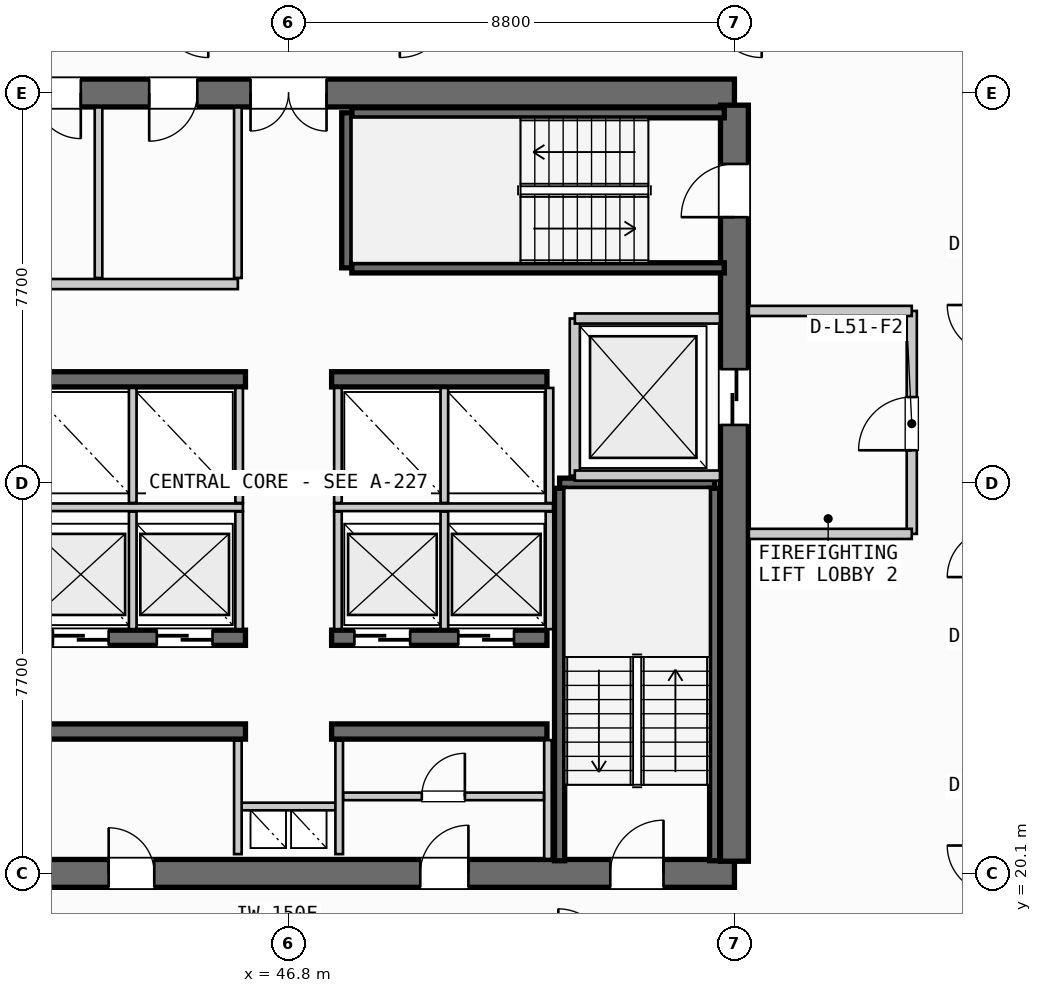
"""IFC4 building model, lengths in metres.
Left out: names, types, materials, properties, quantities, classifications, styles, units other than length and angle.
Written with IfcOpenShell. Run it as: python <this file> out.ifc"""

import sys

from ifc_helpers import new_model, si_unit, direction, frame, frame_2d, origin, place, context, subcontext, project, spatial, rectangle, extrude, source, transform, mapped, element, fill, save


model = new_model("IFC4")
c1 = context("Model", 3, precision=1e-05, world=origin(), true_north=direction((0.0, 1.0)))
c2 = subcontext(c1, "Body", "Model", "MODEL_VIEW")
j1 = project(units=[si_unit("LENGTHUNIT", "METRE"), si_unit("PLANEANGLEUNIT", "RADIAN")], contexts=[c1])
p1 = place(None, origin())
s1 = spatial("IfcSite", under=j1, at=p1, CompositionType="ELEMENT")
p2 = place(p1, origin())
s2 = spatial("IfcBuilding", under=s1, at=p2, CompositionType="ELEMENT")
p3 = place(p2, frame((0.0, 0.0, 197.4)))
s3 = spatial("IfcBuildingStorey", under=s2, at=p3, CompositionType="ELEMENT", Elevation=197.4)
p4 = place(p3, frame((38.0, 20.1, 0.0), z_axis=(0.0, 0.0, 1.0), x_axis=(1.0, 0.0, 0.0)))
e1 = element("IfcWall", 1, at=p4, inside=s3, PredefinedType="SHEAR", context=c2, shape_type="SweptSolid", body=[
    extrude(rectangle(XDim=17.6, YDim=0.55, at=frame_2d((8.8, 0.0))), origin(), (0.0, 0.0, 1.0), 3.26),
])
p5 = place(p4, frame((1.4, 0.0, 0.0)))
e2 = element("IfcOpeningElement", 2, at=p5, cuts=e1, PredefinedType="OPENING", context=c2, shape_type="SweptSolid", body=[
    extrude(rectangle(XDim=1.05, YDim=2.15, at=frame_2d((0.525, 1.075))), frame((0.0, 0.285, 0.0), z_axis=(0.0, -1.0, 0.0), x_axis=(1.0, 0.0, 0.0)), (0.0, 0.0, 1.0), 0.57),
])
p6 = place(p4, frame((15.15, 0.0, 0.0)))
e3 = element("IfcOpeningElement", 3, at=p6, cuts=e1, PredefinedType="OPENING", context=c2, shape_type="SweptSolid", body=[
    extrude(rectangle(XDim=1.05, YDim=2.15, at=frame_2d((0.525, 1.075))), frame((0.0, 0.285, 0.0), z_axis=(0.0, -1.0, 0.0), x_axis=(1.0, 0.0, 0.0)), (0.0, 0.0, 1.0), 0.57),
])
p7 = place(p4, frame((5.25, 0.0, 0.0)))
e4 = element("IfcOpeningElement", 4, at=p7, cuts=e1, PredefinedType="OPENING", context=c2, shape_type="SweptSolid", body=[
    extrude(rectangle(XDim=0.9, YDim=2.15, at=frame_2d((0.45, 1.075))), frame((0.0, 0.285, 0.0), z_axis=(0.0, -1.0, 0.0), x_axis=(1.0, 0.0, 0.0)), (0.0, 0.0, 1.0), 0.57),
])
p8 = place(p4, frame((11.4, 0.0, 0.0)))
e5 = element("IfcOpeningElement", 5, at=p8, cuts=e1, PredefinedType="OPENING", context=c2, shape_type="SweptSolid", body=[
    extrude(rectangle(XDim=0.95, YDim=2.15, at=frame_2d((0.475, 1.075))), frame((0.0, 0.285, 0.0), z_axis=(0.0, -1.0, 0.0), x_axis=(1.0, 0.0, 0.0)), (0.0, 0.0, 1.0), 0.57),
])
p9 = place(p3, frame((55.6, 35.5, 0.0), z_axis=(0.0, 0.0, 1.0), x_axis=(-1.0, 0.0, 0.0)))
e6 = element("IfcWall", 6, at=p9, inside=s3, PredefinedType="SHEAR", context=c2, shape_type="SweptSolid", body=[
    extrude(rectangle(XDim=17.6, YDim=0.55, at=frame_2d((8.8, 0.0))), origin(), (0.0, 0.0, 1.0), 3.26),
])
p10 = place(p9, frame((8.05, 0.0, 0.0)))
e7 = element("IfcOpeningElement", 7, at=p10, cuts=e6, PredefinedType="OPENING", context=c2, shape_type="SweptSolid", body=[
    extrude(rectangle(XDim=1.5, YDim=2.2, at=frame_2d((0.75, 1.1))), frame((0.0, 0.285, 0.0), z_axis=(0.0, -1.0, 0.0), x_axis=(1.0, 0.0, 0.0)), (0.0, 0.0, 1.0), 0.57),
])
p11 = place(p9, frame((15.1, 0.0, 0.0)))
e8 = element("IfcOpeningElement", 8, at=p11, cuts=e6, PredefinedType="OPENING", context=c2, shape_type="SweptSolid", body=[
    extrude(rectangle(XDim=0.95, YDim=2.15, at=frame_2d((0.475, 1.075))), frame((0.0, 0.285, 0.0), z_axis=(0.0, -1.0, 0.0), x_axis=(1.0, 0.0, 0.0)), (0.0, 0.0, 1.0), 0.57),
])
p12 = place(p9, frame((12.9, 0.0, 0.0)))
e9 = element("IfcOpeningElement", 9, at=p12, cuts=e6, PredefinedType="OPENING", context=c2, shape_type="SweptSolid", body=[
    extrude(rectangle(XDim=0.9, YDim=2.15, at=frame_2d((0.45, 1.075))), frame((0.0, 0.285, 0.0), z_axis=(0.0, -1.0, 0.0), x_axis=(1.0, 0.0, 0.0)), (0.0, 0.0, 1.0), 0.57),
])
p13 = place(p9, frame((10.6, 0.0, 0.0)))
e10 = element("IfcOpeningElement", 10, at=p13, cuts=e6, PredefinedType="OPENING", context=c2, shape_type="SweptSolid", body=[
    extrude(rectangle(XDim=0.95, YDim=2.15, at=frame_2d((0.475, 1.075))), frame((0.0, 0.285, 0.0), z_axis=(0.0, -1.0, 0.0), x_axis=(1.0, 0.0, 0.0)), (0.0, 0.0, 1.0), 0.57),
])
p14 = place(p3, frame((55.6, 20.34, 0.0), z_axis=(0.0, 0.0, 1.0), x_axis=(0.0, 1.0, 0.0)))
e11 = element("IfcWall", 11, at=p14, inside=s3, PredefinedType="SHEAR", context=c2, shape_type="SweptSolid", body=[
    extrude(rectangle(XDim=14.92, YDim=0.55, at=frame_2d((7.46, 0.0))), origin(), (0.0, 0.0, 1.0), 3.26),
])
p15 = place(p14, frame((12.71, 0.0, 0.0)))
e12 = element("IfcOpeningElement", 12, at=p15, cuts=e11, PredefinedType="OPENING", context=c2, shape_type="SweptSolid", body=[
    extrude(rectangle(XDim=1.05, YDim=2.15, at=frame_2d((0.525, 1.075))), frame((0.0, 0.285, 0.0), z_axis=(0.0, -1.0, 0.0), x_axis=(1.0, 0.0, 0.0)), (0.0, 0.0, 1.0), 0.57),
])
p16 = place(p14, frame((8.61, 0.0, 0.0)))
e13 = element("IfcOpeningElement", 13, at=p16, cuts=e11, PredefinedType="OPENING", context=c2, shape_type="SweptSolid", body=[
    extrude(rectangle(XDim=1.1, YDim=2.2, at=frame_2d((0.55, 1.1))), frame((0.0, 0.285, 0.0), z_axis=(0.0, -1.0, 0.0), x_axis=(1.0, 0.0, 0.0)), (0.0, 0.0, 1.0), 0.57),
])
for number, where, z_axis, x_axis in (
    (14, (41.7, 22.9, 0.0), (0.0, 0.0, 1.0), (1.0, 0.0, 0.0)),
    (15, (47.65, 22.9, 0.0), (0.0, 0.0, 1.0), (1.0, 0.0, 0.0)),
):
    element("IfcWall", number, at=place(p3, frame(where, z_axis=z_axis, x_axis=x_axis)), inside=s3, PredefinedType="SHEAR", context=c2, shape_type="SweptSolid", body=[
        extrude(rectangle(XDim=4.25, YDim=0.3, at=frame_2d((2.125, 0.0))), origin(), (0.0, 0.0, 1.0), 3.26),
    ])
p17 = place(p3, frame((41.7, 24.75, 0.0), z_axis=(0.0, 0.0, 1.0), x_axis=(1.0, 0.0, 0.0)))
e16 = element("IfcWall", 16, at=p17, inside=s3, PredefinedType="SHEAR", context=c2, shape_type="SweptSolid", body=[
    extrude(rectangle(XDim=4.25, YDim=0.3, at=frame_2d((2.125, 0.0))), origin(), (0.0, 0.0, 1.0), 3.26),
])
p18 = place(p17, frame((0.45, 0.0, 0.0)))
e17 = element("IfcOpeningElement", 17, at=p18, cuts=e16, PredefinedType="OPENING", context=c2, shape_type="SweptSolid", body=[
    extrude(rectangle(XDim=1.1, YDim=2.2, at=frame_2d((0.55, 1.1))), frame((0.0, 0.16, 0.0), z_axis=(0.0, -1.0, 0.0), x_axis=(1.0, 0.0, 0.0)), (0.0, 0.0, 1.0), 0.32),
])
p19 = place(p17, frame((2.5, 0.0, 0.0)))
e18 = element("IfcOpeningElement", 18, at=p19, cuts=e16, PredefinedType="OPENING", context=c2, shape_type="SweptSolid", body=[
    extrude(rectangle(XDim=1.1, YDim=2.2, at=frame_2d((0.55, 1.1))), frame((0.0, 0.16, 0.0), z_axis=(0.0, -1.0, 0.0), x_axis=(1.0, 0.0, 0.0)), (0.0, 0.0, 1.0), 0.32),
])
p20 = place(p3, frame((47.65, 24.75, 0.0), z_axis=(0.0, 0.0, 1.0), x_axis=(1.0, 0.0, 0.0)))
e19 = element("IfcWall", 19, at=p20, inside=s3, PredefinedType="SHEAR", context=c2, shape_type="SweptSolid", body=[
    extrude(rectangle(XDim=4.25, YDim=0.3, at=frame_2d((2.125, 0.0))), origin(), (0.0, 0.0, 1.0), 3.26),
])
p21 = place(p20, frame((0.45, 0.0, 0.0)))
e20 = element("IfcOpeningElement", 20, at=p21, cuts=e19, PredefinedType="OPENING", context=c2, shape_type="SweptSolid", body=[
    extrude(rectangle(XDim=1.1, YDim=2.2, at=frame_2d((0.55, 1.1))), frame((0.0, 0.16, 0.0), z_axis=(0.0, -1.0, 0.0), x_axis=(1.0, 0.0, 0.0)), (0.0, 0.0, 1.0), 0.32),
])
p22 = place(p20, frame((2.5, 0.0, 0.0)))
e21 = element("IfcOpeningElement", 21, at=p22, cuts=e19, PredefinedType="OPENING", context=c2, shape_type="SweptSolid", body=[
    extrude(rectangle(XDim=1.1, YDim=2.2, at=frame_2d((0.55, 1.1))), frame((0.0, 0.16, 0.0), z_axis=(0.0, -1.0, 0.0), x_axis=(1.0, 0.0, 0.0)), (0.0, 0.0, 1.0), 0.32),
])
for number, where, z_axis, x_axis in (
    (22, (41.7, 29.85, 0.0), (0.0, 0.0, 1.0), (1.0, 0.0, 0.0)),
    (23, (47.65, 29.85, 0.0), (0.0, 0.0, 1.0), (1.0, 0.0, 0.0)),
):
    element("IfcWall", number, at=place(p3, frame(where, z_axis=z_axis, x_axis=x_axis)), inside=s3, PredefinedType="SHEAR", context=c2, shape_type="SweptSolid", body=[
        extrude(rectangle(XDim=4.25, YDim=0.3, at=frame_2d((2.125, 0.0))), origin(), (0.0, 0.0, 1.0), 3.26),
    ])
p23 = place(p3, frame((52.15, 27.8, 0.0), z_axis=(0.0, 0.0, 1.0), x_axis=(1.0, 0.0, 0.0)))
e24 = element("IfcWall", 24, at=p23, inside=s3, PredefinedType="SHEAR", context=c2, shape_type="SweptSolid", body=[
    extrude(rectangle(XDim=3.06, YDim=0.2, at=frame_2d((1.53, 0.0))), origin(), (0.0, 0.0, 1.0), 3.26),
])
for number, where, z_axis, x_axis in (
    (25, (55.21, 27.7, 0.0), (0.0, 0.0, 1.0), (0.0, -1.0, 0.0)),
    (26, (52.15, 20.35, 0.0), (0.0, 0.0, 1.0), (0.0, 1.0, 0.0)),
):
    element("IfcWall", number, at=place(p3, frame(where, z_axis=z_axis, x_axis=x_axis)), inside=s3, PredefinedType="SHEAR", context=c2, shape_type="SweptSolid", body=[
        extrude(rectangle(XDim=7.35, YDim=0.2, at=frame_2d((3.675, 0.0))), origin(), (0.0, 0.0, 1.0), 3.26),
    ])
p24 = place(p3, frame((47.95, 32.05, 0.0), z_axis=(0.0, 0.0, 1.0), x_axis=(0.0, 1.0, 0.0)))
e27 = element("IfcWall", 27, at=p24, inside=s3, PredefinedType="SHEAR", context=c2, shape_type="SweptSolid", body=[
    extrude(rectangle(XDim=3.06, YDim=0.2, at=frame_2d((1.53, 0.0))), origin(), (0.0, 0.0, 1.0), 3.26),
])
for number, where, z_axis, x_axis in (
    (28, (48.05, 35.11, 0.0), (0.0, 0.0, 1.0), (1.0, 0.0, 0.0)),
    (29, (55.4, 32.05, 0.0), (0.0, 0.0, 1.0), (-1.0, 0.0, 0.0)),
):
    element("IfcWall", number, at=place(p3, frame(where, z_axis=z_axis, x_axis=x_axis)), inside=s3, PredefinedType="SHEAR", context=c2, shape_type="SweptSolid", body=[
        extrude(rectangle(XDim=7.35, YDim=0.2, at=frame_2d((3.675, 0.0))), origin(), (0.0, 0.0, 1.0), 3.26),
    ])
p25 = place(p3, frame((45.8, 21.42, 0.0), z_axis=(0.0, 0.0, 1.0), x_axis=(1.0, 0.0, 0.0)))
e30 = element("IfcWall", 30, at=p25, inside=s3, PredefinedType="PARTITIONING", context=c2, shape_type="SweptSolid", body=[
    extrude(rectangle(XDim=2.0, YDim=0.15, at=frame_2d((1.0, 0.0))), origin(), (0.0, 0.0, 1.0), 2.595),
])
for number, where, z_axis, x_axis in (
    (31, (45.8, 20.48, 0.0), (0.0, 0.0, 1.0), (0.0, 1.0, 0.0)),
    (32, (47.8, 20.48, 0.0), (0.0, 0.0, 1.0), (0.0, 1.0, 0.0)),
):
    element("IfcWall", number, at=place(p3, frame(where, z_axis=z_axis, x_axis=x_axis)), inside=s3, PredefinedType="PARTITIONING", context=c2, shape_type="SweptSolid", body=[
        extrude(rectangle(XDim=2.24, YDim=0.15, at=frame_2d((1.12, 0.0))), origin(), (0.0, 0.0, 1.0), 2.595),
    ])
p26 = place(p3, frame((52.45, 27.95, 0.0), z_axis=(0.0, 0.0, 1.0), x_axis=(0.0, 1.0, 0.0)))
e33 = element("IfcWall", 33, at=p26, inside=s3, PredefinedType="PARTITIONING", context=c2, shape_type="SweptSolid", body=[
    extrude(rectangle(XDim=3.1, YDim=0.2, at=frame_2d((1.55, 0.0))), origin(), (0.0, 0.0, 1.0), 2.595),
])
for number, where, z_axis, x_axis in (
    (34, (52.45, 27.95, 0.0), (0.0, 0.0, 1.0), (1.0, 0.0, 0.0)),
    (35, (52.45, 31.05, 0.0), (0.0, 0.0, 1.0), (1.0, 0.0, 0.0)),
):
    element("IfcWall", number, at=place(p3, frame(where, z_axis=z_axis, x_axis=x_axis)), inside=s3, PredefinedType="PARTITIONING", context=c2, shape_type="SweptSolid", body=[
        extrude(rectangle(XDim=2.865, YDim=0.2, at=frame_2d((1.433, 0.0))), origin(), (0.0, 0.0, 1.0), 2.595),
    ])
p27 = place(p3, frame((59.1, 26.8, 0.0), z_axis=(0.0, 0.0, 1.0), x_axis=(0.0, 1.0, 0.0)))
e36 = element("IfcWall", 36, at=p27, inside=s3, PredefinedType="PARTITIONING", context=c2, shape_type="SweptSolid", body=[
    extrude(rectangle(XDim=4.4, YDim=0.2, at=frame_2d((2.2, 0.0))), origin(), (0.0, 0.0, 1.0), 2.595),
])
p28 = place(p27, frame((1.65, 0.0, 0.0)))
e37 = element("IfcOpeningElement", 37, at=p28, cuts=e36, PredefinedType="OPENING", context=c2, shape_type="SweptSolid", body=[
    extrude(rectangle(XDim=1.05, YDim=2.15, at=frame_2d((0.525, 1.075))), frame((0.0, 0.11, 0.0), z_axis=(0.0, -1.0, 0.0), x_axis=(1.0, 0.0, 0.0)), (0.0, 0.0, 1.0), 0.22),
])
for number, where, z_axis, x_axis in (
    (38, (55.885, 26.8, 0.0), (0.0, 0.0, 1.0), (1.0, 0.0, 0.0)),
    (39, (55.885, 31.2, 0.0), (0.0, 0.0, 1.0), (1.0, 0.0, 0.0)),
):
    element("IfcWall", number, at=place(p3, frame(where, z_axis=z_axis, x_axis=x_axis)), inside=s3, PredefinedType="PARTITIONING", context=c2, shape_type="SweptSolid", body=[
        extrude(rectangle(XDim=3.215, YDim=0.2, at=frame_2d((1.607, 0.0))), origin(), (0.0, 0.0, 1.0), 2.595),
    ])
p29 = place(p3, frame((51.92, 20.385, 0.0), z_axis=(0.0, 0.0, 1.0), x_axis=(0.0, 1.0, 0.0)))
e40 = element("IfcWall", 40, at=p29, inside=s3, PredefinedType="PARTITIONING", context=c2, shape_type="SweptSolid", body=[
    extrude(rectangle(XDim=2.345, YDim=0.15, at=frame_2d((1.172, 0.0))), origin(), (0.0, 0.0, 1.0), 2.595),
])
p30 = place(p3, frame((47.88, 21.62, 0.0), z_axis=(0.0, 0.0, 1.0), x_axis=(1.0, 0.0, 0.0)))
e41 = element("IfcWall", 41, at=p30, inside=s3, PredefinedType="PARTITIONING", context=c2, shape_type="SweptSolid", body=[
    extrude(rectangle(XDim=3.96, YDim=0.15, at=frame_2d((1.98, 0.0))), origin(), (0.0, 0.0, 1.0), 2.595),
])
p31 = place(p30, frame((1.55, 0.0, 0.0)))
e42 = element("IfcOpeningElement", 42, at=p31, cuts=e41, PredefinedType="OPENING", context=c2, shape_type="SweptSolid", body=[
    extrude(rectangle(XDim=0.85, YDim=2.15, at=frame_2d((0.425, 1.075))), frame((0.0, 0.085, 0.0), z_axis=(0.0, -1.0, 0.0), x_axis=(1.0, 0.0, 0.0)), (0.0, 0.0, 1.0), 0.17),
])
p32 = place(p3, frame((41.58, 27.325, 0.0), z_axis=(0.0, 0.0, 1.0), x_axis=(1.0, 0.0, 0.0)))
e43 = element("IfcWall", 43, at=p32, inside=s3, PredefinedType="PARTITIONING", context=c2, shape_type="SweptSolid", body=[
    extrude(rectangle(XDim=4.32, YDim=0.15, at=frame_2d((2.16, 0.0))), origin(), (0.0, 0.0, 1.0), 2.595),
])
p33 = place(p3, frame((47.7, 27.325, 0.0), z_axis=(0.0, 0.0, 1.0), x_axis=(1.0, 0.0, 0.0)))
e44 = element("IfcWall", 44, at=p33, inside=s3, PredefinedType="PARTITIONING", context=c2, shape_type="SweptSolid", body=[
    extrude(rectangle(XDim=4.32, YDim=0.15, at=frame_2d((2.16, 0.0))), origin(), (0.0, 0.0, 1.0), 2.595),
])
for number, where, z_axis, x_axis in (
    (45, (43.725, 24.92, 0.0), (0.0, 0.0, 1.0), (0.0, 1.0, 0.0)),
    (46, (45.825, 24.92, 0.0), (0.0, 0.0, 1.0), (0.0, 1.0, 0.0)),
    (47, (47.775, 24.92, 0.0), (0.0, 0.0, 1.0), (0.0, 1.0, 0.0)),
    (48, (49.875, 24.92, 0.0), (0.0, 0.0, 1.0), (0.0, 1.0, 0.0)),
    (49, (51.95, 24.92, 0.0), (0.0, 0.0, 1.0), (0.0, 1.0, 0.0)),
):
    element("IfcWall", number, at=place(p3, frame(where, z_axis=z_axis, x_axis=x_axis)), inside=s3, PredefinedType="PARTITIONING", context=c2, shape_type="SweptSolid", body=[
        extrude(rectangle(XDim=2.32, YDim=0.15, at=frame_2d((1.16, 0.0))), origin(), (0.0, 0.0, 1.0), 2.595),
    ])
for number, where, z_axis, x_axis in (
    (50, (43.725, 27.41, 0.0), (0.0, 0.0, 1.0), (0.0, 1.0, 0.0)),
    (51, (45.825, 27.41, 0.0), (0.0, 0.0, 1.0), (0.0, 1.0, 0.0)),
    (52, (47.775, 27.41, 0.0), (0.0, 0.0, 1.0), (0.0, 1.0, 0.0)),
    (53, (49.875, 27.41, 0.0), (0.0, 0.0, 1.0), (0.0, 1.0, 0.0)),
    (54, (51.95, 27.41, 0.0), (0.0, 0.0, 1.0), (0.0, 1.0, 0.0)),
):
    element("IfcWall", number, at=place(p3, frame(where, z_axis=z_axis, x_axis=x_axis)), inside=s3, PredefinedType="PARTITIONING", context=c2, shape_type="SweptSolid", body=[
        extrude(rectangle(XDim=2.27, YDim=0.15, at=frame_2d((1.135, 0.0))), origin(), (0.0, 0.0, 1.0), 2.595),
    ])
p34 = place(p3, frame((38.285, 31.73, 0.0), z_axis=(0.0, 0.0, 1.0), x_axis=(1.0, 0.0, 0.0)))
e55 = element("IfcWall", 55, at=p34, inside=s3, PredefinedType="PARTITIONING", context=c2, shape_type="SweptSolid", body=[
    extrude(rectangle(XDim=7.515, YDim=0.2, at=frame_2d((3.758, 0.0))), origin(), (0.0, 0.0, 1.0), 2.595),
])
p35 = place(p3, frame((45.8, 31.85, 0.0), z_axis=(0.0, 0.0, 1.0), x_axis=(0.0, 1.0, 0.0)))
e56 = element("IfcWall", 56, at=p35, inside=s3, PredefinedType="PARTITIONING", context=c2, shape_type="SweptSolid", body=[
    extrude(rectangle(XDim=3.365, YDim=0.15, at=frame_2d((1.683, 0.0))), origin(), (0.0, 0.0, 1.0), 2.595),
])
p36 = place(p3, frame((43.05, 31.85, 0.0), z_axis=(0.0, 0.0, 1.0), x_axis=(0.0, 1.0, 0.0)))
e57 = element("IfcWall", 57, at=p36, inside=s3, PredefinedType="PLUMBINGWALL", context=c2, shape_type="SweptSolid", body=[
    extrude(rectangle(XDim=3.365, YDim=0.15, at=frame_2d((1.683, 0.0))), origin(), (0.0, 0.0, 1.0), 2.595),
])
m1 = source(origin(), c2, "Body", "SweptSolid", [
    extrude(rectangle(XDim=1.05, YDim=2.15, at=frame_2d((0.525, 1.075))), frame((0.0, 0.025, 0.0), z_axis=(0.0, -1.0, 0.0), x_axis=(1.0, 0.0, 0.0)), (0.0, 0.0, 1.0), 0.05),
])
p37 = place(p6, origin())
e58 = element("IfcDoor", 58, at=p37, inside=s3, OperationType="SINGLE_SWING_RIGHT", PredefinedType="DOOR", context=c2, shape_type="MappedRepresentation", body=[
    mapped(m1, transform((0.0, 0.0, 0.0), scale=1.0)),
])
fill(e3, e58)
p38 = place(p15, origin())
e59 = element("IfcDoor", 59, at=p38, inside=s3, OperationType="SINGLE_SWING_LEFT", PredefinedType="DOOR", context=c2, shape_type="MappedRepresentation", body=[
    mapped(m1, transform((0.0, 0.0, 0.0), scale=1.0)),
])
fill(e12, e59)
m2 = source(origin(), c2, "Body", "SweptSolid", [
    extrude(rectangle(XDim=1.5, YDim=2.2, at=frame_2d((0.75, 1.1))), frame((0.0, 0.025, 0.0), z_axis=(0.0, -1.0, 0.0), x_axis=(1.0, 0.0, 0.0)), (0.0, 0.0, 1.0), 0.05),
])
p39 = place(p10, origin())
e60 = element("IfcDoor", 60, at=p39, inside=s3, OperationType="DOUBLE_DOOR_SINGLE_SWING", PredefinedType="DOOR", context=c2, shape_type="MappedRepresentation", body=[
    mapped(m2, transform((0.0, 0.0, 0.0), scale=1.0)),
])
fill(e7, e60)
m3 = source(origin(), c2, "Body", "SweptSolid", [
    extrude(rectangle(XDim=1.1, YDim=2.2, at=frame_2d((0.55, 1.1))), frame((0.0, 0.025, 0.0), z_axis=(0.0, -1.0, 0.0), x_axis=(1.0, 0.0, 0.0)), (0.0, 0.0, 1.0), 0.05),
])
p40 = place(p16, origin())
e61 = element("IfcDoor", 61, at=p40, inside=s3, OperationType="SLIDING_TO_RIGHT", PredefinedType="DOOR", context=c2, shape_type="MappedRepresentation", body=[
    mapped(m3, transform((0.0, 0.0, 0.0), scale=1.0)),
])
fill(e13, e61)
m4 = source(origin(), c2, "Body", "SweptSolid", [
    extrude(rectangle(XDim=0.9, YDim=2.15, at=frame_2d((0.45, 1.075))), frame((0.0, 0.025, 0.0), z_axis=(0.0, -1.0, 0.0), x_axis=(1.0, 0.0, 0.0)), (0.0, 0.0, 1.0), 0.05),
])
p41 = place(p7, origin())
e62 = element("IfcDoor", 62, at=p41, inside=s3, OperationType="SINGLE_SWING_LEFT", PredefinedType="DOOR", context=c2, shape_type="MappedRepresentation", body=[
    mapped(m4, transform((0.0, 0.0, 0.0), scale=1.0)),
])
fill(e4, e62)
m5 = source(origin(), c2, "Body", "SweptSolid", [
    extrude(rectangle(XDim=0.95, YDim=2.15, at=frame_2d((0.475, 1.075))), frame((0.0, 0.025, 0.0), z_axis=(0.0, -1.0, 0.0), x_axis=(1.0, 0.0, 0.0)), (0.0, 0.0, 1.0), 0.05),
])
p42 = place(p8, origin())
e63 = element("IfcDoor", 63, at=p42, inside=s3, OperationType="SINGLE_SWING_RIGHT", PredefinedType="DOOR", context=c2, shape_type="MappedRepresentation", body=[
    mapped(m5, transform((0.0, 0.0, 0.0), scale=1.0)),
])
fill(e5, e63)
p43 = place(p18, origin())
e64 = element("IfcDoor", 64, at=p43, inside=s3, OperationType="SLIDING_TO_RIGHT", PredefinedType="DOOR", context=c2, shape_type="MappedRepresentation", body=[
    mapped(m3, transform((0.0, 0.0, 0.0), scale=1.0)),
])
fill(e17, e64)
p44 = place(p19, origin())
e65 = element("IfcDoor", 65, at=p44, inside=s3, OperationType="SLIDING_TO_RIGHT", PredefinedType="DOOR", context=c2, shape_type="MappedRepresentation", body=[
    mapped(m3, transform((0.0, 0.0, 0.0), scale=1.0)),
])
fill(e18, e65)
p45 = place(p21, origin())
e66 = element("IfcDoor", 66, at=p45, inside=s3, OperationType="SLIDING_TO_RIGHT", PredefinedType="DOOR", context=c2, shape_type="MappedRepresentation", body=[
    mapped(m3, transform((0.0, 0.0, 0.0), scale=1.0)),
])
fill(e20, e66)
p46 = place(p22, origin())
e67 = element("IfcDoor", 67, at=p46, inside=s3, OperationType="SLIDING_TO_RIGHT", PredefinedType="DOOR", context=c2, shape_type="MappedRepresentation", body=[
    mapped(m3, transform((0.0, 0.0, 0.0), scale=1.0)),
])
fill(e21, e67)
p47 = place(p12, origin())
e68 = element("IfcDoor", 68, at=p47, inside=s3, OperationType="SINGLE_SWING_LEFT", PredefinedType="DOOR", context=c2, shape_type="MappedRepresentation", body=[
    mapped(m4, transform((0.0, 0.0, 0.0), scale=1.0)),
])
fill(e9, e68)
p48 = place(p13, origin())
e69 = element("IfcDoor", 69, at=p48, inside=s3, OperationType="SINGLE_SWING_RIGHT", PredefinedType="DOOR", context=c2, shape_type="MappedRepresentation", body=[
    mapped(m5, transform((0.0, 0.0, 0.0), scale=1.0)),
])
fill(e10, e69)
p49 = place(p28, origin())
e70 = element("IfcDoor", 70, at=p49, inside=s3, OperationType="SINGLE_SWING_LEFT", PredefinedType="DOOR", context=c2, shape_type="MappedRepresentation", body=[
    mapped(m1, transform((0.0, 0.0, 0.0), scale=1.0)),
])
fill(e37, e70)
m6 = source(origin(), c2, "Body", "SweptSolid", [
    extrude(rectangle(XDim=0.85, YDim=2.15, at=frame_2d((0.425, 1.075))), frame((0.0, 0.025, 0.0), z_axis=(0.0, -1.0, 0.0), x_axis=(1.0, 0.0, 0.0)), (0.0, 0.0, 1.0), 0.05),
])
p50 = place(p31, origin())
e71 = element("IfcDoor", 71, at=p50, inside=s3, OperationType="SINGLE_SWING_RIGHT", PredefinedType="DOOR", context=c2, shape_type="MappedRepresentation", body=[
    mapped(m6, transform((0.0, 0.0, 0.0), scale=1.0)),
])
fill(e42, e71)
save(model, sys.argv[1])
